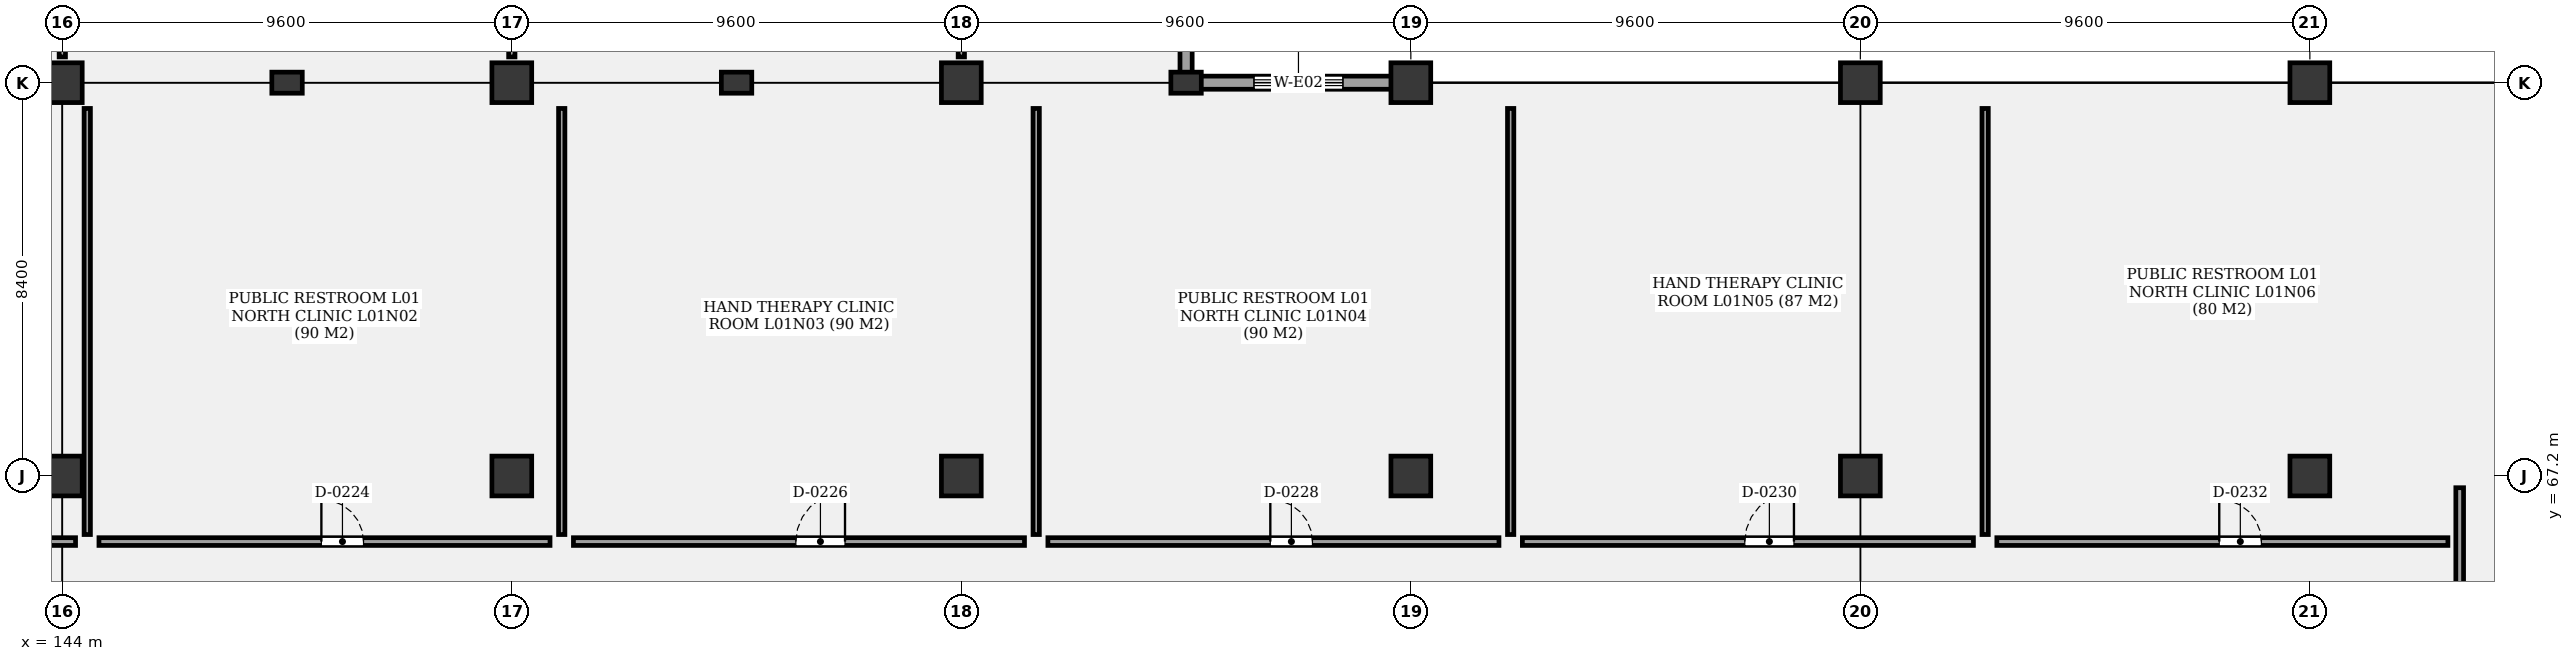
"""IFC4 building model, lengths in metres.
Left out: names, types, materials, properties, quantities, classifications, styles, units other than length and angle.
Written with IfcOpenShell. Run it as: python <this file> out.ifc"""

import sys

from ifc_helpers import new_model, si_unit, direction, frame, frame_2d, origin, origin_2d, place, context, subcontext, project, spatial, rectangle, extrude, element, fill, save


model = new_model("IFC4")
c1 = context("Model", 3, precision=1e-05, world=origin(), true_north=direction((0.0, 1.0)))
c2 = subcontext(c1, "Body", "Model", "MODEL_VIEW")
j1 = project(units=[si_unit("LENGTHUNIT", "METRE"), si_unit("PLANEANGLEUNIT", "RADIAN")], contexts=[c1])
p1 = place(None, origin())
s1 = spatial("IfcSite", under=j1, at=p1, CompositionType="ELEMENT")
p2 = place(p1, origin())
s2 = spatial("IfcBuilding", under=s1, at=p2, CompositionType="ELEMENT")
p3 = place(p2, frame((0.0, 0.0, 5.1)))
s3 = spatial("IfcBuildingStorey", under=s2, at=p3, CompositionType="ELEMENT", Elevation=5.1)
for number, where, z_axis, x_axis in (
    (1, (144.0, 67.2, 0.0), (0.0, 0.0, 1.0), (1.0, 0.0, 0.0)),
    (2, (144.0, 75.6, 0.0), (0.0, 0.0, 1.0), (1.0, 0.0, 0.0)),
    (3, (153.6, 67.2, 0.0), (0.0, 0.0, 1.0), (1.0, 0.0, 0.0)),
    (4, (153.6, 75.6, 0.0), (0.0, 0.0, 1.0), (1.0, 0.0, 0.0)),
    (5, (163.2, 67.2, 0.0), (0.0, 0.0, 1.0), (1.0, 0.0, 0.0)),
    (6, (163.2, 75.6, 0.0), (0.0, 0.0, 1.0), (1.0, 0.0, 0.0)),
    (7, (172.8, 67.2, 0.0), (0.0, 0.0, 1.0), (1.0, 0.0, 0.0)),
    (8, (172.8, 75.6, 0.0), (0.0, 0.0, 1.0), (1.0, 0.0, 0.0)),
    (9, (182.4, 67.2, 0.0), (0.0, 0.0, 1.0), (1.0, 0.0, 0.0)),
    (10, (182.4, 75.6, 0.0), (0.0, 0.0, 1.0), (1.0, 0.0, 0.0)),
    (11, (192.0, 67.2, 0.0), (0.0, 0.0, 1.0), (1.0, 0.0, 0.0)),
    (12, (192.0, 75.6, 0.0), (0.0, 0.0, 1.0), (1.0, 0.0, 0.0)),
):
    element("IfcColumn", number, at=place(p3, frame(where, z_axis=z_axis, x_axis=x_axis)), inside=s3, PredefinedType="COLUMN", context=c2, shape_type="SweptSolid", body=[
        extrude(rectangle(XDim=0.85, YDim=0.85, at=origin_2d()), origin(), (0.0, 0.0, 1.0), 4.8),
    ])
for number, where, z_axis, x_axis in (
    (13, (148.8, 75.6, 0.0), (0.0, 0.0, 1.0), (1.0, 0.0, 0.0)),
    (14, (158.4, 75.6, 0.0), (0.0, 0.0, 1.0), (1.0, 0.0, 0.0)),
    (15, (168.0, 75.6, 0.0), (0.0, 0.0, 1.0), (1.0, 0.0, 0.0)),
):
    element("IfcColumn", number, at=place(p3, frame(where, z_axis=z_axis, x_axis=x_axis)), inside=s3, PredefinedType="PILASTER", context=c2, shape_type="SweptSolid", body=[
        extrude(rectangle(XDim=0.65, YDim=0.45, at=origin_2d()), origin(), (0.0, 0.0, 1.0), 4.8),
    ])
p4 = place(p3, frame((168.0, 75.6, 0.0), z_axis=(0.0, 0.0, 1.0), x_axis=(1.0, 0.0, 0.0)))
e16 = element("IfcWall", 16, at=p4, inside=s3, PredefinedType="SOLIDWALL", context=c2, shape_type="SweptSolid", body=[
    extrude(rectangle(XDim=4.8, YDim=0.28, at=frame_2d((2.4, 0.0))), origin(), (0.0, 0.0, 1.0), 3.94),
])
p5 = place(p4, frame((1.45, 0.0, 0.85)))
e17 = element("IfcOpeningElement", 17, at=p5, cuts=e16, PredefinedType="OPENING", context=c2, shape_type="SweptSolid", body=[
    extrude(rectangle(XDim=1.9, YDim=1.2, at=frame_2d((0.95, 0.6))), frame((0.0, 0.15, 0.0), z_axis=(0.0, -1.0, 0.0), x_axis=(1.0, 0.0, 0.0)), (0.0, 0.0, 1.0), 0.3),
])
p6 = place(p3, frame((168.0, 79.64, 0.0), z_axis=(0.0, 0.0, 1.0), x_axis=(0.0, -1.0, 0.0)))
e18 = element("IfcWall", 18, at=p6, inside=s3, PredefinedType="SOLIDWALL", context=c2, shape_type="SweptSolid", body=[
    extrude(rectangle(XDim=3.88, YDim=0.26, at=frame_2d((1.94, 0.0))), origin(), (0.0, 0.0, 1.0), 3.94),
])
for number, where, z_axis, x_axis in (
    (19, (144.0, 76.15, 0.0), (0.0, 0.0, 1.0), (0.0, 1.0, 0.0)),
    (20, (153.6, 76.15, 0.0), (0.0, 0.0, 1.0), (0.0, 1.0, 0.0)),
    (21, (163.2, 76.15, 0.0), (0.0, 0.0, 1.0), (0.0, 1.0, 0.0)),
):
    element("IfcWall", number, at=place(p3, frame(where, z_axis=z_axis, x_axis=x_axis)), inside=s3, PredefinedType="PARTITIONING", context=c2, shape_type="SweptSolid", body=[
        extrude(rectangle(XDim=10.9, YDim=0.135, at=frame_2d((5.45, 0.0))), origin(), (0.0, 0.0, 1.0), 3.68),
    ])
p7 = place(p3, frame((195.2, 58.37, 0.0), z_axis=(0.0, 0.0, 1.0), x_axis=(0.0, 1.0, 0.0)))
e22 = element("IfcWall", 22, at=p7, inside=s3, PredefinedType="PARTITIONING", context=c2, shape_type="SweptSolid", body=[
    extrude(rectangle(XDim=8.58, YDim=0.165, at=frame_2d((4.29, 0.0))), origin(), (0.0, 0.0, 1.0), 3.68),
])
p8 = place(p7, frame((2.45, 0.0, 0.0)))
e23 = element("IfcOpeningElement", 23, at=p8, cuts=e22, PredefinedType="OPENING", context=c2, shape_type="SweptSolid", body=[
    extrude(rectangle(XDim=1.15, YDim=2.2, at=frame_2d((0.575, 1.1))), frame((0.0, 0.093, 0.0), z_axis=(0.0, -1.0, 0.0), x_axis=(1.0, 0.0, 0.0)), (0.0, 0.0, 1.0), 0.185),
])
p9 = place(p3, frame((134.65, 65.8, 0.0), z_axis=(0.0, 0.0, 1.0), x_axis=(1.0, 0.0, 0.0)))
e24 = element("IfcWall", 24, at=p9, inside=s3, PredefinedType="PARTITIONING", context=c2, shape_type="SweptSolid", body=[
    extrude(rectangle(XDim=9.633, YDim=0.165, at=frame_2d((4.816, 0.0))), origin(), (0.0, 0.0, 1.0), 3.68),
])
p10 = place(p9, frame((4.75, 0.0, 0.0)))
e25 = element("IfcOpeningElement", 25, at=p10, cuts=e24, PredefinedType="OPENING", context=c2, shape_type="SweptSolid", body=[
    extrude(rectangle(XDim=1.05, YDim=2.1, at=frame_2d((0.525, 1.05))), frame((0.0, 0.093, 0.0), z_axis=(0.0, -1.0, 0.0), x_axis=(1.0, 0.0, 0.0)), (0.0, 0.0, 1.0), 0.185),
])
p11 = place(p3, frame((144.783, 65.8, 0.0), z_axis=(0.0, 0.0, 1.0), x_axis=(1.0, 0.0, 0.0)))
e26 = element("IfcWall", 26, at=p11, inside=s3, PredefinedType="PARTITIONING", context=c2, shape_type="SweptSolid", body=[
    extrude(rectangle(XDim=9.633, YDim=0.165, at=frame_2d((4.816, 0.0))), origin(), (0.0, 0.0, 1.0), 3.68),
])
p12 = place(p11, frame((4.75, 0.0, 0.0)))
e27 = element("IfcOpeningElement", 27, at=p12, cuts=e26, PredefinedType="OPENING", context=c2, shape_type="SweptSolid", body=[
    extrude(rectangle(XDim=0.9, YDim=2.1, at=frame_2d((0.45, 1.05))), frame((0.0, 0.093, 0.0), z_axis=(0.0, -1.0, 0.0), x_axis=(1.0, 0.0, 0.0)), (0.0, 0.0, 1.0), 0.185),
])
p13 = place(p3, frame((144.533, 65.95, 0.0), z_axis=(0.0, 0.0, 1.0), x_axis=(0.0, 1.0, 0.0)))
e28 = element("IfcWall", 28, at=p13, inside=s3, PredefinedType="PARTITIONING", context=c2, shape_type="SweptSolid", body=[
    extrude(rectangle(XDim=9.1, YDim=0.135, at=frame_2d((4.55, 0.0))), origin(), (0.0, 0.0, 1.0), 3.68),
])
p14 = place(p3, frame((154.916, 65.8, 0.0), z_axis=(0.0, 0.0, 1.0), x_axis=(1.0, 0.0, 0.0)))
e29 = element("IfcWall", 29, at=p14, inside=s3, PredefinedType="PARTITIONING", context=c2, shape_type="SweptSolid", body=[
    extrude(rectangle(XDim=9.633, YDim=0.165, at=frame_2d((4.816, 0.0))), origin(), (0.0, 0.0, 1.0), 3.68),
])
p15 = place(p14, frame((4.75, 0.0, 0.0)))
e30 = element("IfcOpeningElement", 30, at=p15, cuts=e29, PredefinedType="OPENING", context=c2, shape_type="SweptSolid", body=[
    extrude(rectangle(XDim=1.05, YDim=2.1, at=frame_2d((0.525, 1.05))), frame((0.0, 0.093, 0.0), z_axis=(0.0, -1.0, 0.0), x_axis=(1.0, 0.0, 0.0)), (0.0, 0.0, 1.0), 0.185),
])
p16 = place(p3, frame((154.666, 65.95, 0.0), z_axis=(0.0, 0.0, 1.0), x_axis=(0.0, 1.0, 0.0)))
e31 = element("IfcWall", 31, at=p16, inside=s3, PredefinedType="PARTITIONING", context=c2, shape_type="SweptSolid", body=[
    extrude(rectangle(XDim=9.1, YDim=0.135, at=frame_2d((4.55, 0.0))), origin(), (0.0, 0.0, 1.0), 3.68),
])
p17 = place(p3, frame((165.049, 65.8, 0.0), z_axis=(0.0, 0.0, 1.0), x_axis=(1.0, 0.0, 0.0)))
e32 = element("IfcWall", 32, at=p17, inside=s3, PredefinedType="PARTITIONING", context=c2, shape_type="SweptSolid", body=[
    extrude(rectangle(XDim=9.633, YDim=0.165, at=frame_2d((4.816, 0.0))), origin(), (0.0, 0.0, 1.0), 3.68),
])
p18 = place(p17, frame((4.75, 0.0, 0.0)))
e33 = element("IfcOpeningElement", 33, at=p18, cuts=e32, PredefinedType="OPENING", context=c2, shape_type="SweptSolid", body=[
    extrude(rectangle(XDim=0.9, YDim=2.1, at=frame_2d((0.45, 1.05))), frame((0.0, 0.093, 0.0), z_axis=(0.0, -1.0, 0.0), x_axis=(1.0, 0.0, 0.0)), (0.0, 0.0, 1.0), 0.185),
])
p19 = place(p3, frame((164.799, 65.95, 0.0), z_axis=(0.0, 0.0, 1.0), x_axis=(0.0, 1.0, 0.0)))
e34 = element("IfcWall", 34, at=p19, inside=s3, PredefinedType="PARTITIONING", context=c2, shape_type="SweptSolid", body=[
    extrude(rectangle(XDim=9.1, YDim=0.135, at=frame_2d((4.55, 0.0))), origin(), (0.0, 0.0, 1.0), 3.68),
])
p20 = place(p3, frame((175.182, 65.8, 0.0), z_axis=(0.0, 0.0, 1.0), x_axis=(1.0, 0.0, 0.0)))
e35 = element("IfcWall", 35, at=p20, inside=s3, PredefinedType="PARTITIONING", context=c2, shape_type="SweptSolid", body=[
    extrude(rectangle(XDim=9.633, YDim=0.165, at=frame_2d((4.816, 0.0))), origin(), (0.0, 0.0, 1.0), 3.68),
])
p21 = place(p20, frame((4.75, 0.0, 0.0)))
e36 = element("IfcOpeningElement", 36, at=p21, cuts=e35, PredefinedType="OPENING", context=c2, shape_type="SweptSolid", body=[
    extrude(rectangle(XDim=1.05, YDim=2.1, at=frame_2d((0.525, 1.05))), frame((0.0, 0.093, 0.0), z_axis=(0.0, -1.0, 0.0), x_axis=(1.0, 0.0, 0.0)), (0.0, 0.0, 1.0), 0.185),
])
p22 = place(p3, frame((174.932, 65.95, 0.0), z_axis=(0.0, 0.0, 1.0), x_axis=(0.0, 1.0, 0.0)))
e37 = element("IfcWall", 37, at=p22, inside=s3, PredefinedType="PARTITIONING", context=c2, shape_type="SweptSolid", body=[
    extrude(rectangle(XDim=9.1, YDim=0.135, at=frame_2d((4.55, 0.0))), origin(), (0.0, 0.0, 1.0), 3.68),
])
p23 = place(p3, frame((185.315, 65.8, 0.0), z_axis=(0.0, 0.0, 1.0), x_axis=(1.0, 0.0, 0.0)))
e38 = element("IfcWall", 38, at=p23, inside=s3, PredefinedType="PARTITIONING", context=c2, shape_type="SweptSolid", body=[
    extrude(rectangle(XDim=9.633, YDim=0.165, at=frame_2d((4.816, 0.0))), origin(), (0.0, 0.0, 1.0), 3.68),
])
p24 = place(p23, frame((4.75, 0.0, 0.0)))
e39 = element("IfcOpeningElement", 39, at=p24, cuts=e38, PredefinedType="OPENING", context=c2, shape_type="SweptSolid", body=[
    extrude(rectangle(XDim=0.9, YDim=2.1, at=frame_2d((0.45, 1.05))), frame((0.0, 0.093, 0.0), z_axis=(0.0, -1.0, 0.0), x_axis=(1.0, 0.0, 0.0)), (0.0, 0.0, 1.0), 0.185),
])
p25 = place(p3, frame((185.065, 65.95, 0.0), z_axis=(0.0, 0.0, 1.0), x_axis=(0.0, 1.0, 0.0)))
e40 = element("IfcWall", 40, at=p25, inside=s3, PredefinedType="PARTITIONING", context=c2, shape_type="SweptSolid", body=[
    extrude(rectangle(XDim=9.1, YDim=0.135, at=frame_2d((4.55, 0.0))), origin(), (0.0, 0.0, 1.0), 3.68),
])
p26 = place(p5, origin())
e41 = element("IfcWindow", 41, at=p26, inside=s3, PartitioningType="SINGLE_PANEL", PredefinedType="WINDOW", context=c2, shape_type="SweptSolid", body=[
    extrude(rectangle(XDim=1.9, YDim=1.2, at=frame_2d((0.95, 0.6))), frame((0.0, 0.03, 0.0), z_axis=(0.0, -1.0, 0.0), x_axis=(1.0, 0.0, 0.0)), (0.0, 0.0, 1.0), 0.06),
])
fill(e17, e41)
p27 = place(p12, origin())
e42 = element("IfcDoor", 42, at=p27, inside=s3, OperationType="SINGLE_SWING_LEFT", PredefinedType="DOOR", context=c2, shape_type="SweptSolid", body=[
    extrude(rectangle(XDim=0.9, YDim=2.1, at=frame_2d((0.45, 1.05))), frame((0.0, 0.025, 0.0), z_axis=(0.0, -1.0, 0.0), x_axis=(1.0, 0.0, 0.0)), (0.0, 0.0, 1.0), 0.05),
])
fill(e27, e42)
p28 = place(p15, origin())
e43 = element("IfcDoor", 43, at=p28, inside=s3, OperationType="SINGLE_SWING_RIGHT", PredefinedType="DOOR", context=c2, shape_type="SweptSolid", body=[
    extrude(rectangle(XDim=1.05, YDim=2.1, at=frame_2d((0.525, 1.05))), frame((0.0, 0.025, 0.0), z_axis=(0.0, -1.0, 0.0), x_axis=(1.0, 0.0, 0.0)), (0.0, 0.0, 1.0), 0.05),
])
fill(e30, e43)
p29 = place(p18, origin())
e44 = element("IfcDoor", 44, at=p29, inside=s3, OperationType="SINGLE_SWING_LEFT", PredefinedType="DOOR", context=c2, shape_type="SweptSolid", body=[
    extrude(rectangle(XDim=0.9, YDim=2.1, at=frame_2d((0.45, 1.05))), frame((0.0, 0.025, 0.0), z_axis=(0.0, -1.0, 0.0), x_axis=(1.0, 0.0, 0.0)), (0.0, 0.0, 1.0), 0.05),
])
fill(e33, e44)
p30 = place(p21, origin())
e45 = element("IfcDoor", 45, at=p30, inside=s3, OperationType="SINGLE_SWING_RIGHT", PredefinedType="DOOR", context=c2, shape_type="SweptSolid", body=[
    extrude(rectangle(XDim=1.05, YDim=2.1, at=frame_2d((0.525, 1.05))), frame((0.0, 0.025, 0.0), z_axis=(0.0, -1.0, 0.0), x_axis=(1.0, 0.0, 0.0)), (0.0, 0.0, 1.0), 0.05),
])
fill(e36, e45)
p31 = place(p24, origin())
e46 = element("IfcDoor", 46, at=p31, inside=s3, OperationType="SINGLE_SWING_LEFT", PredefinedType="DOOR", context=c2, shape_type="SweptSolid", body=[
    extrude(rectangle(XDim=0.9, YDim=2.1, at=frame_2d((0.45, 1.05))), frame((0.0, 0.025, 0.0), z_axis=(0.0, -1.0, 0.0), x_axis=(1.0, 0.0, 0.0)), (0.0, 0.0, 1.0), 0.05),
])
fill(e39, e46)
save(model, sys.argv[1])
